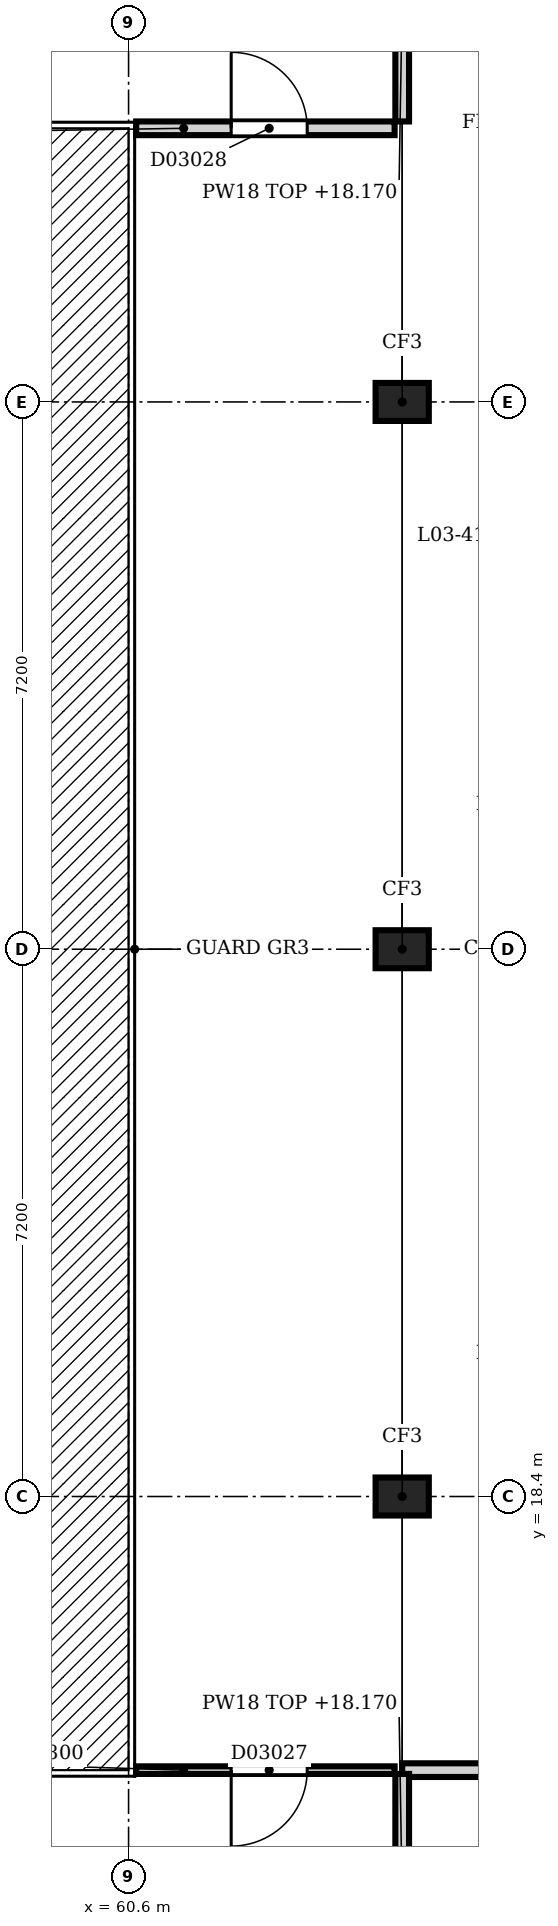
"""IFC4 building model, lengths in metres.
Left out: names, types, materials, properties, quantities, classifications, styles, units other than length and angle.
Written with IfcOpenShell. Run it as: python <this file> out.ifc"""

import sys

from ifc_helpers import new_model, si_unit, direction, frame, frame_2d, origin, origin_2d, place, context, subcontext, project, spatial, rectangle, extrude, element, fill, save


model = new_model("IFC4")
c1 = context("Model", 3, precision=1e-05, world=origin(), true_north=direction((0.0, 1.0)))
c2 = subcontext(c1, "Body", "Model", "MODEL_VIEW")
j1 = project(units=[si_unit("LENGTHUNIT", "METRE"), si_unit("PLANEANGLEUNIT", "RADIAN")], contexts=[c1])
p1 = place(None, origin())
s1 = spatial("IfcSite", under=j1, at=p1, CompositionType="ELEMENT")
p2 = place(p1, origin())
s2 = spatial("IfcBuilding", under=s1, at=p2, CompositionType="ELEMENT")
p3 = place(p2, frame((0.0, 0.0, 14.4)))
s3 = spatial("IfcBuildingStorey", under=s2, at=p3, CompositionType="ELEMENT", Elevation=14.4)
for number, where, z_axis, x_axis in (
    (1, (64.2, 18.4, 0.0), (0.0, 0.0, 1.0), (1.0, 0.0, 0.0)),
    (2, (64.2, 25.6, 0.0), (0.0, 0.0, 1.0), (1.0, 0.0, 0.0)),
    (3, (64.2, 32.8, 0.0), (0.0, 0.0, 1.0), (1.0, 0.0, 0.0)),
):
    element("IfcColumn", number, at=place(p3, frame(where, z_axis=z_axis, x_axis=x_axis)), inside=s3, PredefinedType="COLUMN", context=c2, shape_type="SweptSolid", body=[
        extrude(rectangle(XDim=0.7, YDim=0.5, at=origin_2d()), origin(), (0.0, 0.0, 1.0), 4.5),
    ])
p4 = place(p3, frame((64.1, 14.8, 0.0), z_axis=(0.0, 0.0, 1.0), x_axis=(-1.0, 0.0, 0.0)))
e4 = element("IfcWall", 4, at=p4, inside=s3, PredefinedType="PARTITIONING", context=c2, shape_type="SweptSolid", body=[
    extrude(rectangle(XDim=3.4, YDim=0.1, at=frame_2d((1.7, 0.0))), origin(), (0.0, 0.0, 1.0), 11.4),
])
p5 = place(p4, frame((1.15, 0.0, 0.0)))
e5 = element("IfcOpeningElement", 5, at=p5, cuts=e4, PredefinedType="OPENING", context=c2, shape_type="SweptSolid", body=[
    extrude(rectangle(XDim=1.0, YDim=2.1, at=frame_2d((0.5, 1.05))), frame((0.0, 0.06, 0.0), z_axis=(0.0, -1.0, 0.0), x_axis=(1.0, 0.0, 0.0)), (0.0, 0.0, 1.0), 0.12),
])
p6 = place(p3, frame((67.8, 14.8, 0.0), z_axis=(0.0, 0.0, 1.0), x_axis=(-1.0, 0.0, 0.0)))
e6 = element("IfcWall", 6, at=p6, inside=s3, PredefinedType="PARTITIONING", context=c2, shape_type="SweptSolid", body=[
    extrude(rectangle(XDim=3.6, YDim=0.18, at=frame_2d((1.8, 0.0))), origin(), (0.0, 0.0, 1.0), 4.3),
])
p7 = place(p6, frame((1.35, 0.0, 0.0)))
e7 = element("IfcOpeningElement", 7, at=p7, cuts=e6, PredefinedType="OPENING", context=c2, shape_type="SweptSolid", body=[
    extrude(rectangle(XDim=1.0, YDim=2.1, at=frame_2d((0.5, 1.05))), frame((0.0, 0.1, 0.0), z_axis=(0.0, -1.0, 0.0), x_axis=(1.0, 0.0, 0.0)), (0.0, 0.0, 1.0), 0.2),
])
p8 = place(p3, frame((60.7, 36.4, 0.0), z_axis=(0.0, 0.0, 1.0), x_axis=(1.0, 0.0, 0.0)))
e8 = element("IfcWall", 8, at=p8, inside=s3, PredefinedType="PARTITIONING", context=c2, shape_type="SweptSolid", body=[
    extrude(rectangle(XDim=3.4, YDim=0.18, at=frame_2d((1.7, 0.0))), origin(), (0.0, 0.0, 1.0), 11.4),
])
p9 = place(p8, frame((1.25, 0.0, 0.0)))
e9 = element("IfcOpeningElement", 9, at=p9, cuts=e8, PredefinedType="OPENING", context=c2, shape_type="SweptSolid", body=[
    extrude(rectangle(XDim=1.0, YDim=2.1, at=frame_2d((0.5, 1.05))), frame((0.0, 0.1, 0.0), z_axis=(0.0, -1.0, 0.0), x_axis=(1.0, 0.0, 0.0)), (0.0, 0.0, 1.0), 0.2),
])
p10 = place(p3, frame((64.2, 11.4, 0.0), z_axis=(0.0, 0.0, 1.0), x_axis=(0.0, 1.0, 0.0)))
e10 = element("IfcWall", 10, at=p10, inside=s3, PredefinedType="PARTITIONING", context=c2, shape_type="SweptSolid", body=[
    extrude(rectangle(XDim=3.35, YDim=0.18, at=frame_2d((1.675, 0.0))), origin(), (0.0, 0.0, 1.0), 3.77),
])
p11 = place(p3, frame((64.2, 36.49, 0.0), z_axis=(0.0, 0.0, 1.0), x_axis=(0.0, 1.0, 0.0)))
e11 = element("IfcWall", 11, at=p11, inside=s3, PredefinedType="PARTITIONING", context=c2, shape_type="SweptSolid", body=[
    extrude(rectangle(XDim=3.31, YDim=0.18, at=frame_2d((1.655, 0.0))), origin(), (0.0, 0.0, 1.0), 3.77),
])
p12 = place(p5, origin())
e12 = element("IfcDoor", 12, at=p12, inside=s3, OperationType="SINGLE_SWING_LEFT", PredefinedType="DOOR", context=c2, shape_type="SweptSolid", body=[
    extrude(rectangle(XDim=1.0, YDim=2.1, at=frame_2d((0.5, 1.05))), frame((0.0, 0.025, 0.0), z_axis=(0.0, -1.0, 0.0), x_axis=(1.0, 0.0, 0.0)), (0.0, 0.0, 1.0), 0.05),
])
fill(e5, e12)
p13 = place(p9, origin())
e13 = element("IfcDoor", 13, at=p13, inside=s3, OperationType="SINGLE_SWING_RIGHT", PredefinedType="DOOR", context=c2, shape_type="SweptSolid", body=[
    extrude(rectangle(XDim=1.0, YDim=2.1, at=frame_2d((0.5, 1.05))), frame((0.0, 0.025, 0.0), z_axis=(0.0, -1.0, 0.0), x_axis=(1.0, 0.0, 0.0)), (0.0, 0.0, 1.0), 0.05),
])
fill(e9, e13)
save(model, sys.argv[1])
